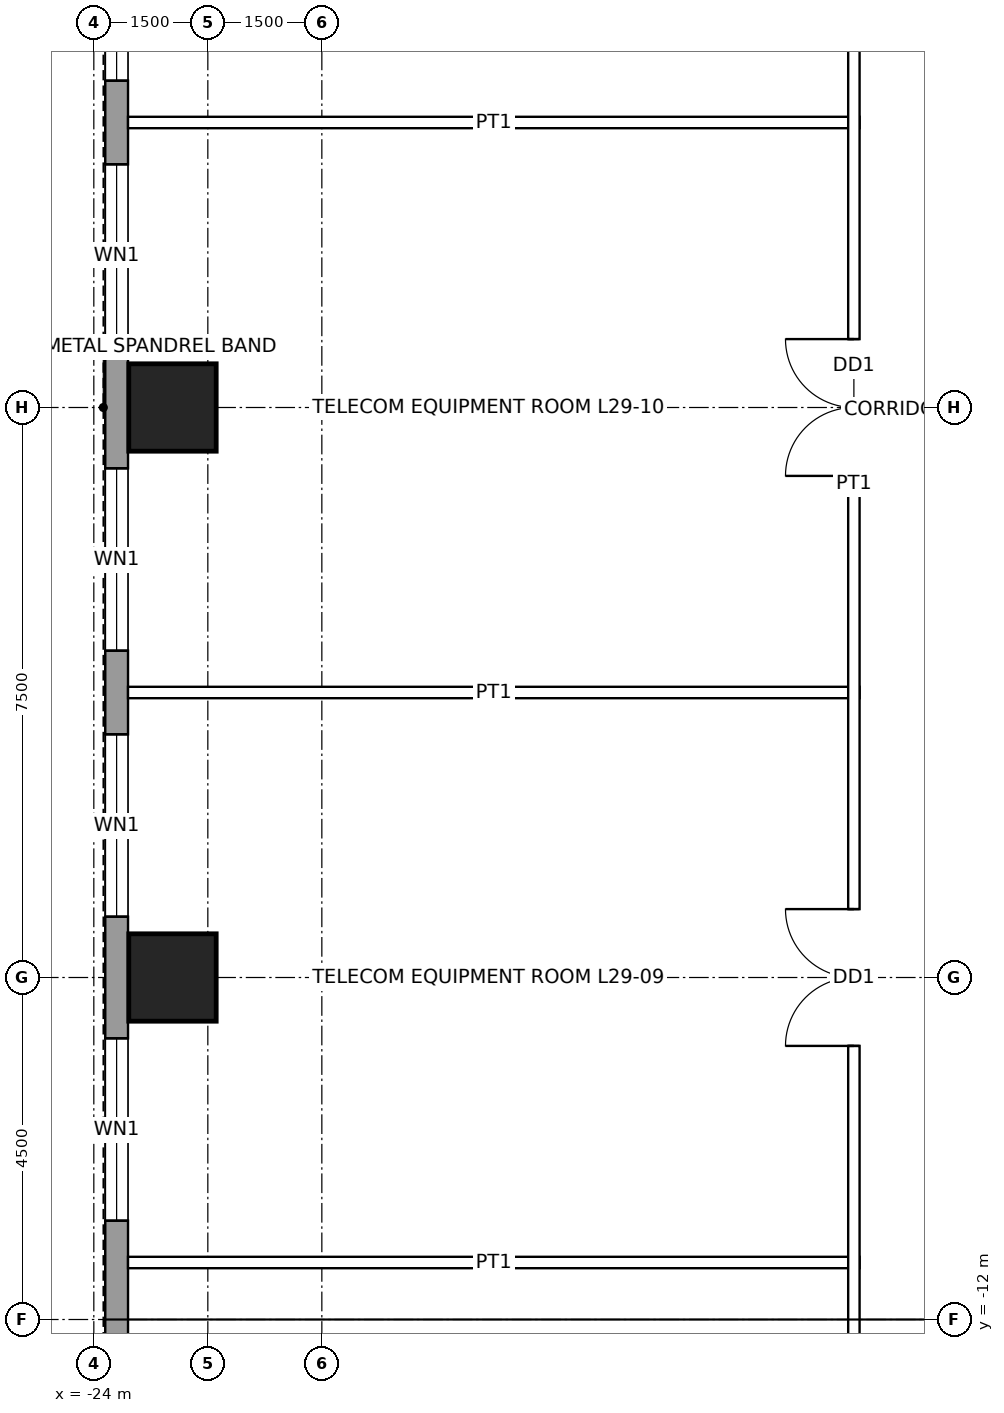
"""IFC4 building model, lengths in metres.
Left out: names, types, materials, properties, quantities, classifications, styles, units other than length and angle.
Written with IfcOpenShell. Run it as: python <this file> out.ifc"""

import sys

from ifc_helpers import new_model, si_unit, direction, frame, frame_2d, origin, origin_2d, place, context, subcontext, project, spatial, rectangle, hollow_rectangle, extrude, element, fill, save


model = new_model("IFC4")
c1 = context("Model", 3, precision=1e-05, world=origin(), true_north=direction((0.0, 1.0)))
c2 = subcontext(c1, "Body", "Model", "MODEL_VIEW")
j1 = project(units=[si_unit("LENGTHUNIT", "METRE"), si_unit("PLANEANGLEUNIT", "RADIAN")], contexts=[c1])
p1 = place(None, origin())
s1 = spatial("IfcSite", under=j1, at=p1, CompositionType="ELEMENT")
p2 = place(p1, origin())
s2 = spatial("IfcBuilding", under=s1, at=p2, CompositionType="ELEMENT")
p3 = place(p2, frame((0.0, 0.0, 144.9)))
s3 = spatial("IfcBuildingStorey", under=s2, at=p3, CompositionType="ELEMENT", Elevation=144.9)
for number, where, z_axis, x_axis in (
    (1, (-22.965, -7.5, 0.0), (0.0, 0.0, 1.0), (1.0, 0.0, 0.0)),
    (2, (-22.965, 0.0, 0.0), (0.0, 0.0, 1.0), (1.0, 0.0, 0.0)),
):
    element("IfcColumn", number, at=place(p3, frame(where, z_axis=z_axis, x_axis=x_axis)), inside=s3, PredefinedType="COLUMN", context=c2, shape_type="SweptSolid", body=[
        extrude(hollow_rectangle(XDim=1.15, YDim=1.15, WallThickness=0.075, at=origin_2d()), origin(), (0.0, 0.0, 1.0), 4.5),
    ])
p4 = place(p3, frame((-23.7, -16.2, 0.0), z_axis=(0.0, 0.0, 1.0), x_axis=(0.0, 1.0, 0.0)))
e3 = element("IfcWall", 3, at=p4, inside=s3, PredefinedType="SOLIDWALL", context=c2, shape_type="SweptSolid", body=[
    extrude(rectangle(XDim=32.4, YDim=0.3, at=frame_2d((16.2, 0.0))), origin(), (0.0, 0.0, 1.0), 4.3),
])
p5 = place(p4, frame((0.95, 0.0, 1.0)))
e4 = element("IfcOpeningElement", 4, at=p5, cuts=e3, PredefinedType="OPENING", context=c2, shape_type="SweptSolid", body=[
    extrude(rectangle(XDim=1.8, YDim=1.2, at=frame_2d((0.9, 0.6))), frame((0.0, 0.16, 0.0), z_axis=(0.0, -1.0, 0.0), x_axis=(1.0, 0.0, 0.0)), (0.0, 0.0, 1.0), 0.32),
])
p6 = place(p4, frame((5.5, 0.0, 1.0)))
e5 = element("IfcOpeningElement", 5, at=p6, cuts=e3, PredefinedType="OPENING", context=c2, shape_type="SweptSolid", body=[
    extrude(rectangle(XDim=2.4, YDim=1.2, at=frame_2d((1.2, 0.6))), frame((0.0, 0.16, 0.0), z_axis=(0.0, -1.0, 0.0), x_axis=(1.0, 0.0, 0.0)), (0.0, 0.0, 1.0), 0.32),
])
p7 = place(p4, frame((9.5, 0.0, 1.0)))
e6 = element("IfcOpeningElement", 6, at=p7, cuts=e3, PredefinedType="OPENING", context=c2, shape_type="SweptSolid", body=[
    extrude(rectangle(XDim=2.4, YDim=1.2, at=frame_2d((1.2, 0.6))), frame((0.0, 0.16, 0.0), z_axis=(0.0, -1.0, 0.0), x_axis=(1.0, 0.0, 0.0)), (0.0, 0.0, 1.0), 0.32),
])
p8 = place(p4, frame((13.0, 0.0, 1.0)))
e7 = element("IfcOpeningElement", 7, at=p8, cuts=e3, PredefinedType="OPENING", context=c2, shape_type="SweptSolid", body=[
    extrude(rectangle(XDim=2.4, YDim=1.2, at=frame_2d((1.2, 0.6))), frame((0.0, 0.16, 0.0), z_axis=(0.0, -1.0, 0.0), x_axis=(1.0, 0.0, 0.0)), (0.0, 0.0, 1.0), 0.32),
])
p9 = place(p4, frame((17.0, 0.0, 1.0)))
e8 = element("IfcOpeningElement", 8, at=p9, cuts=e3, PredefinedType="OPENING", context=c2, shape_type="SweptSolid", body=[
    extrude(rectangle(XDim=2.4, YDim=1.2, at=frame_2d((1.2, 0.6))), frame((0.0, 0.16, 0.0), z_axis=(0.0, -1.0, 0.0), x_axis=(1.0, 0.0, 0.0)), (0.0, 0.0, 1.0), 0.32),
])
p10 = place(p4, frame((20.5, 0.0, 1.0)))
e9 = element("IfcOpeningElement", 9, at=p10, cuts=e3, PredefinedType="OPENING", context=c2, shape_type="SweptSolid", body=[
    extrude(rectangle(XDim=2.4, YDim=1.2, at=frame_2d((1.2, 0.6))), frame((0.0, 0.16, 0.0), z_axis=(0.0, -1.0, 0.0), x_axis=(1.0, 0.0, 0.0)), (0.0, 0.0, 1.0), 0.32),
])
p11 = place(p4, frame((24.5, 0.0, 1.0)))
e10 = element("IfcOpeningElement", 10, at=p11, cuts=e3, PredefinedType="OPENING", context=c2, shape_type="SweptSolid", body=[
    extrude(rectangle(XDim=2.4, YDim=1.2, at=frame_2d((1.2, 0.6))), frame((0.0, 0.16, 0.0), z_axis=(0.0, -1.0, 0.0), x_axis=(1.0, 0.0, 0.0)), (0.0, 0.0, 1.0), 0.32),
])
p12 = place(p4, frame((29.65, 0.0, 1.0)))
e11 = element("IfcOpeningElement", 11, at=p12, cuts=e3, PredefinedType="OPENING", context=c2, shape_type="SweptSolid", body=[
    extrude(rectangle(XDim=1.8, YDim=1.2, at=frame_2d((0.9, 0.6))), frame((0.0, 0.16, 0.0), z_axis=(0.0, -1.0, 0.0), x_axis=(1.0, 0.0, 0.0)), (0.0, 0.0, 1.0), 0.32),
])
for number, where, z_axis, x_axis in (
    (12, (-23.55, -11.25, 0.0), (0.0, 0.0, 1.0), (1.0, 0.0, 0.0)),
    (13, (-23.55, -3.75, 0.0), (0.0, 0.0, 1.0), (1.0, 0.0, 0.0)),
    (14, (-23.55, 3.75, 0.0), (0.0, 0.0, 1.0), (1.0, 0.0, 0.0)),
):
    element("IfcWall", number, at=place(p3, frame(where, z_axis=z_axis, x_axis=x_axis)), inside=s3, PredefinedType="PARTITIONING", context=c2, shape_type="SweptSolid", body=[
        extrude(rectangle(XDim=9.625, YDim=0.15, at=frame_2d((4.812, 0.0))), origin(), (0.0, 0.0, 1.0), 3.431),
    ])
p13 = place(p3, frame((-14.0, -14.075, 0.0), z_axis=(0.0, 0.0, 1.0), x_axis=(0.0, 1.0, 0.0)))
e15 = element("IfcWall", 15, at=p13, inside=s3, PredefinedType="PARTITIONING", context=c2, shape_type="SweptSolid", body=[
    extrude(rectangle(XDim=26.15, YDim=0.15, at=frame_2d((13.075, 0.0))), origin(), (0.0, 0.0, 1.0), 4.3),
])
p14 = place(p13, frame((5.675, 0.0, 0.0)))
e16 = element("IfcOpeningElement", 16, at=p14, cuts=e15, PredefinedType="OPENING", context=c2, shape_type="SweptSolid", body=[
    extrude(rectangle(XDim=1.8, YDim=2.4, at=frame_2d((0.9, 1.2))), frame((0.0, 0.085, 0.0), z_axis=(0.0, -1.0, 0.0), x_axis=(1.0, 0.0, 0.0)), (0.0, 0.0, 1.0), 0.17),
])
p15 = place(p13, frame((13.175, 0.0, 0.0)))
e17 = element("IfcOpeningElement", 17, at=p15, cuts=e15, PredefinedType="OPENING", context=c2, shape_type="SweptSolid", body=[
    extrude(rectangle(XDim=1.8, YDim=2.4, at=frame_2d((0.9, 1.2))), frame((0.0, 0.085, 0.0), z_axis=(0.0, -1.0, 0.0), x_axis=(1.0, 0.0, 0.0)), (0.0, 0.0, 1.0), 0.17),
])
p16 = place(p13, frame((20.675, 0.0, 0.0)))
e18 = element("IfcOpeningElement", 18, at=p16, cuts=e15, PredefinedType="OPENING", context=c2, shape_type="SweptSolid", body=[
    extrude(rectangle(XDim=1.8, YDim=2.4, at=frame_2d((0.9, 1.2))), frame((0.0, 0.085, 0.0), z_axis=(0.0, -1.0, 0.0), x_axis=(1.0, 0.0, 0.0)), (0.0, 0.0, 1.0), 0.17),
])
p17 = place(p6, origin())
e19 = element("IfcWindow", 19, at=p17, inside=s3, PartitioningType="SINGLE_PANEL", PredefinedType="WINDOW", context=c2, shape_type="SweptSolid", body=[
    extrude(rectangle(XDim=2.4, YDim=1.2, at=frame_2d((1.2, 0.6))), frame((0.0, 0.03, 0.0), z_axis=(0.0, -1.0, 0.0), x_axis=(1.0, 0.0, 0.0)), (0.0, 0.0, 1.0), 0.06),
])
fill(e5, e19)
p18 = place(p7, origin())
e20 = element("IfcWindow", 20, at=p18, inside=s3, PartitioningType="SINGLE_PANEL", PredefinedType="WINDOW", context=c2, shape_type="SweptSolid", body=[
    extrude(rectangle(XDim=2.4, YDim=1.2, at=frame_2d((1.2, 0.6))), frame((0.0, 0.03, 0.0), z_axis=(0.0, -1.0, 0.0), x_axis=(1.0, 0.0, 0.0)), (0.0, 0.0, 1.0), 0.06),
])
fill(e6, e20)
p19 = place(p8, origin())
e21 = element("IfcWindow", 21, at=p19, inside=s3, PartitioningType="SINGLE_PANEL", PredefinedType="WINDOW", context=c2, shape_type="SweptSolid", body=[
    extrude(rectangle(XDim=2.4, YDim=1.2, at=frame_2d((1.2, 0.6))), frame((0.0, 0.03, 0.0), z_axis=(0.0, -1.0, 0.0), x_axis=(1.0, 0.0, 0.0)), (0.0, 0.0, 1.0), 0.06),
])
fill(e7, e21)
p20 = place(p9, origin())
e22 = element("IfcWindow", 22, at=p20, inside=s3, PartitioningType="SINGLE_PANEL", PredefinedType="WINDOW", context=c2, shape_type="SweptSolid", body=[
    extrude(rectangle(XDim=2.4, YDim=1.2, at=frame_2d((1.2, 0.6))), frame((0.0, 0.03, 0.0), z_axis=(0.0, -1.0, 0.0), x_axis=(1.0, 0.0, 0.0)), (0.0, 0.0, 1.0), 0.06),
])
fill(e8, e22)
p21 = place(p10, origin())
e23 = element("IfcWindow", 23, at=p21, inside=s3, PartitioningType="SINGLE_PANEL", PredefinedType="WINDOW", context=c2, shape_type="SweptSolid", body=[
    extrude(rectangle(XDim=2.4, YDim=1.2, at=frame_2d((1.2, 0.6))), frame((0.0, 0.03, 0.0), z_axis=(0.0, -1.0, 0.0), x_axis=(1.0, 0.0, 0.0)), (0.0, 0.0, 1.0), 0.06),
])
fill(e9, e23)
p22 = place(p14, origin())
e24 = element("IfcDoor", 24, at=p22, inside=s3, OperationType="DOUBLE_DOOR_SINGLE_SWING", PredefinedType="DOOR", context=c2, shape_type="SweptSolid", body=[
    extrude(rectangle(XDim=1.8, YDim=2.4, at=frame_2d((0.9, 1.2))), frame((0.0, 0.025, 0.0), z_axis=(0.0, -1.0, 0.0), x_axis=(1.0, 0.0, 0.0)), (0.0, 0.0, 1.0), 0.05),
])
fill(e16, e24)
p23 = place(p15, origin())
e25 = element("IfcDoor", 25, at=p23, inside=s3, OperationType="DOUBLE_DOOR_SINGLE_SWING", PredefinedType="DOOR", context=c2, shape_type="SweptSolid", body=[
    extrude(rectangle(XDim=1.8, YDim=2.4, at=frame_2d((0.9, 1.2))), frame((0.0, 0.025, 0.0), z_axis=(0.0, -1.0, 0.0), x_axis=(1.0, 0.0, 0.0)), (0.0, 0.0, 1.0), 0.05),
])
fill(e17, e25)
save(model, sys.argv[1])
